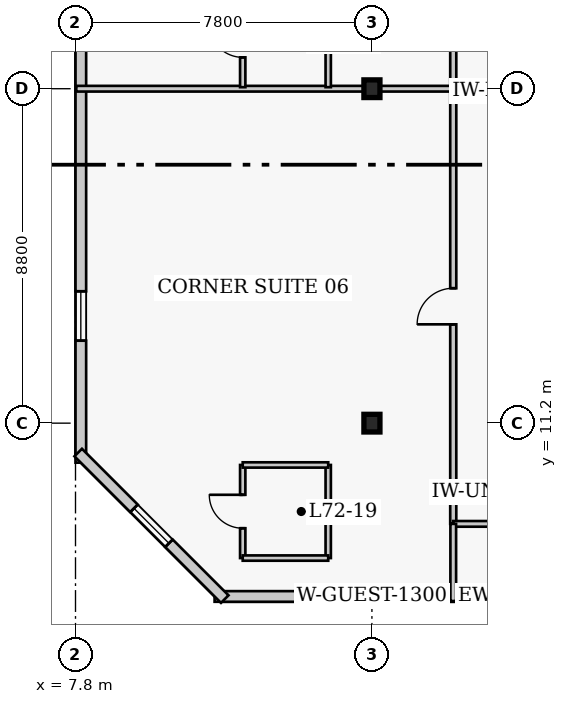
"""IFC4 building model, lengths in metres.
Left out: names, types, materials, properties, quantities, classifications, styles, units other than length and angle.
Written with IfcOpenShell. Run it as: python <this file> out.ifc"""

import sys

from ifc_helpers import new_model, si_unit, direction, frame, frame_2d, origin, origin_2d, place, context, subcontext, project, spatial, rectangle, i_section, extrude, element, fill, save


model = new_model("IFC4")
c1 = context("Model", 3, precision=1e-05, world=origin(), true_north=direction((0.0, 1.0)))
c2 = subcontext(c1, "Body", "Model", "MODEL_VIEW")
j1 = project(units=[si_unit("LENGTHUNIT", "METRE"), si_unit("PLANEANGLEUNIT", "RADIAN")], contexts=[c1])
p1 = place(None, origin())
s1 = spatial("IfcSite", under=j1, at=p1, CompositionType="ELEMENT")
p2 = place(p1, origin())
s2 = spatial("IfcBuilding", under=s1, at=p2, CompositionType="ELEMENT")
p3 = place(p2, frame((0.0, 0.0, 289.4)))
s3 = spatial("IfcBuildingStorey", under=s2, at=p3, CompositionType="ELEMENT", Elevation=289.4)
for number, where, z_axis, x_axis in (
    (1, (15.6, 11.2, 0.0), (0.0, 0.0, 1.0), (1.0, 0.0, 0.0)),
    (2, (15.6, 20.0, 0.0), (0.0, 0.0, 1.0), (1.0, 0.0, 0.0)),
):
    element("IfcColumn", number, at=place(p3, frame(where, z_axis=z_axis, x_axis=x_axis)), inside=s3, PredefinedType="COLUMN", context=c2, shape_type="SweptSolid", body=[
        extrude(i_section(OverallWidth=0.422, OverallDepth=0.465, WebThickness=0.045, FlangeThickness=0.073, FilletRadius=0.017, at=origin_2d()), origin(), (0.0, 0.0, 1.0), 4.0),
    ])
p4 = place(p3, frame((11.46, 6.64, 0.0), z_axis=(0.0, 0.0, 1.0), x_axis=(1.0, 0.0, 0.0)))
e3 = element("IfcWall", 3, at=p4, inside=s3, PredefinedType="SOLIDWALL", context=c2, shape_type="SweptSolid", body=[
    extrude(rectangle(XDim=24.83, YDim=0.28, at=frame_2d((12.415, 0.0))), origin(), (0.0, 0.0, 1.0), 3.76),
])
p5 = place(p4, frame((3.488, 0.0, 0.85)))
e4 = element("IfcOpeningElement", 4, at=p5, cuts=e3, PredefinedType="OPENING", context=c2, shape_type="SweptSolid", body=[
    extrude(rectangle(XDim=1.3, YDim=1.7, at=frame_2d((0.65, 0.85))), frame((0.0, 0.15, 0.0), z_axis=(0.0, -1.0, 0.0), x_axis=(1.0, 0.0, 0.0)), (0.0, 0.0, 1.0), 0.3),
])
p6 = place(p4, frame((20.692, 0.0, 0.85)))
e5 = element("IfcOpeningElement", 5, at=p6, cuts=e3, PredefinedType="OPENING", context=c2, shape_type="SweptSolid", body=[
    extrude(rectangle(XDim=1.3, YDim=1.7, at=frame_2d((0.65, 0.85))), frame((0.0, 0.15, 0.0), z_axis=(0.0, -1.0, 0.0), x_axis=(1.0, 0.0, 0.0)), (0.0, 0.0, 1.0), 0.3),
])
p7 = place(p4, frame((9.475, 0.0, 0.85)))
e6 = element("IfcOpeningElement", 6, at=p7, cuts=e3, PredefinedType="OPENING", context=c2, shape_type="SweptSolid", body=[
    extrude(rectangle(XDim=1.3, YDim=1.7, at=frame_2d((0.65, 0.85))), frame((0.0, 0.15, 0.0), z_axis=(0.0, -1.0, 0.0), x_axis=(1.0, 0.0, 0.0)), (0.0, 0.0, 1.0), 0.3),
])
p8 = place(p4, frame((15.435, 0.0, 0.85)))
e7 = element("IfcOpeningElement", 7, at=p8, cuts=e3, PredefinedType="OPENING", context=c2, shape_type="SweptSolid", body=[
    extrude(rectangle(XDim=1.3, YDim=1.7, at=frame_2d((0.65, 0.85))), frame((0.0, 0.15, 0.0), z_axis=(0.0, -1.0, 0.0), x_axis=(1.0, 0.0, 0.0)), (0.0, 0.0, 1.0), 0.3),
])
p9 = place(p3, frame((7.94, 41.04, 0.0), z_axis=(0.0, 0.0, 1.0), x_axis=(0.0, -1.0, 0.0)))
e8 = element("IfcWall", 8, at=p9, inside=s3, PredefinedType="SOLIDWALL", context=c2, shape_type="SweptSolid", body=[
    extrude(rectangle(XDim=30.88, YDim=0.28, at=frame_2d((15.44, 0.0))), origin(), (0.0, 0.0, 1.0), 3.76),
])
p10 = place(p9, frame((3.21, 0.0, 0.85)))
e9 = element("IfcOpeningElement", 9, at=p10, cuts=e8, PredefinedType="OPENING", context=c2, shape_type="SweptSolid", body=[
    extrude(rectangle(XDim=1.3, YDim=1.7, at=frame_2d((0.65, 0.85))), frame((0.0, 0.15, 0.0), z_axis=(0.0, -1.0, 0.0), x_axis=(1.0, 0.0, 0.0)), (0.0, 0.0, 1.0), 0.3),
])
p11 = place(p9, frame((10.28, 0.0, 0.85)))
e10 = element("IfcOpeningElement", 10, at=p11, cuts=e8, PredefinedType="OPENING", context=c2, shape_type="SweptSolid", body=[
    extrude(rectangle(XDim=1.3, YDim=1.7, at=frame_2d((0.65, 0.85))), frame((0.0, 0.15, 0.0), z_axis=(0.0, -1.0, 0.0), x_axis=(1.0, 0.0, 0.0)), (0.0, 0.0, 1.0), 0.3),
])
p12 = place(p9, frame((18.65, 0.0, 0.85)))
e11 = element("IfcOpeningElement", 11, at=p12, cuts=e8, PredefinedType="OPENING", context=c2, shape_type="SweptSolid", body=[
    extrude(rectangle(XDim=1.3, YDim=1.7, at=frame_2d((0.65, 0.85))), frame((0.0, 0.15, 0.0), z_axis=(0.0, -1.0, 0.0), x_axis=(1.0, 0.0, 0.0)), (0.0, 0.0, 1.0), 0.3),
])
p13 = place(p9, frame((26.37, 0.0, 0.85)))
e12 = element("IfcOpeningElement", 12, at=p13, cuts=e8, PredefinedType="OPENING", context=c2, shape_type="SweptSolid", body=[
    extrude(rectangle(XDim=1.3, YDim=1.7, at=frame_2d((0.65, 0.85))), frame((0.0, 0.15, 0.0), z_axis=(0.0, -1.0, 0.0), x_axis=(1.0, 0.0, 0.0)), (0.0, 0.0, 1.0), 0.3),
])
p14 = place(p3, frame((7.871, 10.427, 0.0), z_axis=(0.0, 0.0, 1.0), x_axis=(0.707129162587, -0.707084399077, 0.0)))
e13 = element("IfcWall", 13, at=p14, inside=s3, PredefinedType="SOLIDWALL", context=c2, shape_type="SweptSolid", body=[
    extrude(rectangle(XDim=5.454, YDim=0.28, at=frame_2d((2.727, 0.0))), origin(), (0.0, 0.0, 1.0), 3.76),
])
p15 = place(p14, frame((2.077, 0.0, 0.85)))
e14 = element("IfcOpeningElement", 14, at=p15, cuts=e13, PredefinedType="OPENING", context=c2, shape_type="SweptSolid", body=[
    extrude(rectangle(XDim=1.3, YDim=1.7, at=frame_2d((0.65, 0.85))), frame((0.0, 0.15, 0.0), z_axis=(0.0, -1.0, 0.0), x_axis=(1.0, 0.0, 0.0)), (0.0, 0.0, 1.0), 0.3),
])
p16 = place(p3, frame((17.74, 8.55, 0.0), z_axis=(0.0, 0.0, 1.0), x_axis=(0.0, 1.0, 0.0)))
e15 = element("IfcWall", 15, at=p16, inside=s3, PredefinedType="PARTITIONING", context=c2, shape_type="SweptSolid", body=[
    extrude(rectangle(XDim=32.1, YDim=0.16, at=frame_2d((16.05, 0.0))), origin(), (0.0, 0.0, 1.0), 3.76),
])
p17 = place(p16, frame((5.25, 0.0, 0.0)))
e16 = element("IfcOpeningElement", 16, at=p17, cuts=e15, PredefinedType="OPENING", context=c2, shape_type="SweptSolid", body=[
    extrude(rectangle(XDim=0.95, YDim=2.1, at=frame_2d((0.475, 1.05))), frame((0.0, 0.09, 0.0), z_axis=(0.0, -1.0, 0.0), x_axis=(1.0, 0.0, 0.0)), (0.0, 0.0, 1.0), 0.18),
])
p18 = place(p16, frame((15.375, 0.0, 0.0)))
e17 = element("IfcOpeningElement", 17, at=p18, cuts=e15, PredefinedType="OPENING", context=c2, shape_type="SweptSolid", body=[
    extrude(rectangle(XDim=0.95, YDim=2.1, at=frame_2d((0.475, 1.05))), frame((0.0, 0.09, 0.0), z_axis=(0.0, -1.0, 0.0), x_axis=(1.0, 0.0, 0.0)), (0.0, 0.0, 1.0), 0.18),
])
p19 = place(p16, frame((23.425, 0.0, 0.0)))
e18 = element("IfcOpeningElement", 18, at=p19, cuts=e15, PredefinedType="OPENING", context=c2, shape_type="SweptSolid", body=[
    extrude(rectangle(XDim=0.95, YDim=2.1, at=frame_2d((0.475, 1.05))), frame((0.0, 0.09, 0.0), z_axis=(0.0, -1.0, 0.0), x_axis=(1.0, 0.0, 0.0)), (0.0, 0.0, 1.0), 0.18),
])
p20 = place(p16, frame((28.1, 0.0, 0.0)))
e19 = element("IfcOpeningElement", 19, at=p20, cuts=e15, PredefinedType="OPENING", context=c2, shape_type="SweptSolid", body=[
    extrude(rectangle(XDim=1.0, YDim=2.15, at=frame_2d((0.5, 1.075))), frame((0.0, 0.09, 0.0), z_axis=(0.0, -1.0, 0.0), x_axis=(1.0, 0.0, 0.0)), (0.0, 0.0, 1.0), 0.18),
])
p21 = place(p3, frame((17.74, 8.55, 0.0), z_axis=(0.0, 0.0, 1.0), x_axis=(1.0, 0.0, 0.0)))
e20 = element("IfcWall", 20, at=p21, inside=s3, PredefinedType="PARTITIONING", context=c2, shape_type="SweptSolid", body=[
    extrude(rectangle(XDim=2.22, YDim=0.15, at=frame_2d((1.11, 0.0))), origin(), (0.0, 0.0, 1.0), 3.76),
])
p22 = place(p3, frame((17.74, 6.52, 0.0), z_axis=(0.0, 0.0, 1.0), x_axis=(0.0, 1.0, 0.0)))
e21 = element("IfcWall", 21, at=p22, inside=s3, PredefinedType="PARTITIONING", context=c2, shape_type="SweptSolid", body=[
    extrude(rectangle(XDim=2.03, YDim=0.15, at=frame_2d((1.015, 0.0))), origin(), (0.0, 0.0, 1.0), 3.76),
])
p23 = place(p3, frame((12.2, 7.65, 0.0), z_axis=(0.0, 0.0, 1.0), x_axis=(0.0, 1.0, 0.0)))
e22 = element("IfcWall", 22, at=p23, inside=s3, PredefinedType="PLUMBINGWALL", context=c2, shape_type="SweptSolid", body=[
    extrude(rectangle(XDim=2.45, YDim=0.14, at=frame_2d((1.225, 0.0))), origin(), (0.0, 0.0, 1.0), 3.76),
])
p24 = place(p23, frame((0.785, 0.0, 0.0)))
e23 = element("IfcOpeningElement", 23, at=p24, cuts=e22, PredefinedType="OPENING", context=c2, shape_type="SweptSolid", body=[
    extrude(rectangle(XDim=0.88, YDim=2.05, at=frame_2d((0.44, 1.025))), frame((0.0, 0.08, 0.0), z_axis=(0.0, -1.0, 0.0), x_axis=(1.0, 0.0, 0.0)), (0.0, 0.0, 1.0), 0.16),
])
p25 = place(p3, frame((14.45, 7.65, 0.0), z_axis=(0.0, 0.0, 1.0), x_axis=(0.0, 1.0, 0.0)))
e24 = element("IfcWall", 24, at=p25, inside=s3, PredefinedType="PLUMBINGWALL", context=c2, shape_type="SweptSolid", body=[
    extrude(rectangle(XDim=2.45, YDim=0.14, at=frame_2d((1.225, 0.0))), origin(), (0.0, 0.0, 1.0), 3.76),
])
for number, where, z_axis, x_axis in (
    (25, (12.2, 7.65, 0.0), (0.0, 0.0, 1.0), (1.0, 0.0, 0.0)),
    (26, (12.2, 10.1, 0.0), (0.0, 0.0, 1.0), (1.0, 0.0, 0.0)),
):
    element("IfcWall", number, at=place(p3, frame(where, z_axis=z_axis, x_axis=x_axis)), inside=s3, PredefinedType="PLUMBINGWALL", context=c2, shape_type="SweptSolid", body=[
        extrude(rectangle(XDim=2.25, YDim=0.14, at=frame_2d((1.125, 0.0))), origin(), (0.0, 0.0, 1.0), 3.76),
    ])
p26 = place(p3, frame((7.82, 20.0, 0.0), z_axis=(0.0, 0.0, 1.0), x_axis=(1.0, 0.0, 0.0)))
e27 = element("IfcWall", 27, at=p26, inside=s3, PredefinedType="PARTITIONING", context=c2, shape_type="SweptSolid", body=[
    extrude(rectangle(XDim=9.92, YDim=0.15, at=frame_2d((4.96, 0.0))), origin(), (0.0, 0.0, 1.0), 3.064),
])
p27 = place(p3, frame((12.2, 20.04, 0.0), z_axis=(0.0, 0.0, 1.0), x_axis=(0.0, 1.0, 0.0)))
e28 = element("IfcWall", 28, at=p27, inside=s3, PredefinedType="PLUMBINGWALL", context=c2, shape_type="SweptSolid", body=[
    extrude(rectangle(XDim=2.45, YDim=0.14, at=frame_2d((1.225, 0.0))), origin(), (0.0, 0.0, 1.0), 3.76),
])
p28 = place(p27, frame((0.785, 0.0, 0.0)))
e29 = element("IfcOpeningElement", 29, at=p28, cuts=e28, PredefinedType="OPENING", context=c2, shape_type="SweptSolid", body=[
    extrude(rectangle(XDim=0.88, YDim=2.05, at=frame_2d((0.44, 1.025))), frame((0.0, 0.08, 0.0), z_axis=(0.0, -1.0, 0.0), x_axis=(1.0, 0.0, 0.0)), (0.0, 0.0, 1.0), 0.16),
])
p29 = place(p3, frame((14.45, 20.04, 0.0), z_axis=(0.0, 0.0, 1.0), x_axis=(0.0, 1.0, 0.0)))
e30 = element("IfcWall", 30, at=p29, inside=s3, PredefinedType="PLUMBINGWALL", context=c2, shape_type="SweptSolid", body=[
    extrude(rectangle(XDim=2.45, YDim=0.14, at=frame_2d((1.225, 0.0))), origin(), (0.0, 0.0, 1.0), 3.76),
])
p30 = place(p5, origin())
e31 = element("IfcWindow", 31, at=p30, inside=s3, PartitioningType="SINGLE_PANEL", PredefinedType="WINDOW", context=c2, shape_type="SweptSolid", body=[
    extrude(rectangle(XDim=1.3, YDim=1.7, at=frame_2d((0.65, 0.85))), frame((0.0, 0.03, 0.0), z_axis=(0.0, -1.0, 0.0), x_axis=(1.0, 0.0, 0.0)), (0.0, 0.0, 1.0), 0.06),
])
fill(e4, e31)
p31 = place(p13, origin())
e32 = element("IfcWindow", 32, at=p31, inside=s3, PartitioningType="SINGLE_PANEL", PredefinedType="WINDOW", context=c2, shape_type="SweptSolid", body=[
    extrude(rectangle(XDim=1.3, YDim=1.7, at=frame_2d((0.65, 0.85))), frame((0.0, 0.03, 0.0), z_axis=(0.0, -1.0, 0.0), x_axis=(1.0, 0.0, 0.0)), (0.0, 0.0, 1.0), 0.06),
])
fill(e12, e32)
p32 = place(p15, origin())
e33 = element("IfcWindow", 33, at=p32, inside=s3, PartitioningType="SINGLE_PANEL", PredefinedType="WINDOW", context=c2, shape_type="SweptSolid", body=[
    extrude(rectangle(XDim=1.3, YDim=1.7, at=frame_2d((0.65, 0.85))), frame((0.0, 0.03, 0.0), z_axis=(0.0, -1.0, 0.0), x_axis=(1.0, 0.0, 0.0)), (0.0, 0.0, 1.0), 0.06),
])
fill(e14, e33)
p33 = place(p24, origin())
e34 = element("IfcDoor", 34, at=p33, inside=s3, OperationType="SINGLE_SWING_RIGHT", PredefinedType="DOOR", context=c2, shape_type="SweptSolid", body=[
    extrude(rectangle(XDim=0.88, YDim=2.05, at=frame_2d((0.44, 1.025))), frame((0.0, 0.025, 0.0), z_axis=(0.0, -1.0, 0.0), x_axis=(1.0, 0.0, 0.0)), (0.0, 0.0, 1.0), 0.05),
])
fill(e23, e34)
p34 = place(p17, origin())
e35 = element("IfcDoor", 35, at=p34, inside=s3, OperationType="SINGLE_SWING_LEFT", PredefinedType="DOOR", context=c2, shape_type="SweptSolid", body=[
    extrude(rectangle(XDim=0.95, YDim=2.1, at=frame_2d((0.475, 1.05))), frame((0.0, 0.025, 0.0), z_axis=(0.0, -1.0, 0.0), x_axis=(1.0, 0.0, 0.0)), (0.0, 0.0, 1.0), 0.05),
])
fill(e16, e35)
p35 = place(p28, origin())
e36 = element("IfcDoor", 36, at=p35, inside=s3, OperationType="SINGLE_SWING_RIGHT", PredefinedType="DOOR", context=c2, shape_type="SweptSolid", body=[
    extrude(rectangle(XDim=0.88, YDim=2.05, at=frame_2d((0.44, 1.025))), frame((0.0, 0.025, 0.0), z_axis=(0.0, -1.0, 0.0), x_axis=(1.0, 0.0, 0.0)), (0.0, 0.0, 1.0), 0.05),
])
fill(e29, e36)
save(model, sys.argv[1])
